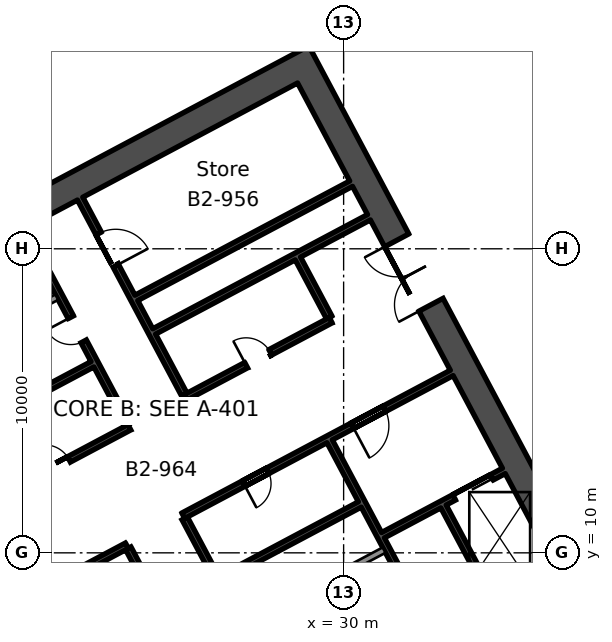
"""IFC4 building model, lengths in metres.
Left out: names, types, materials, properties, quantities, classifications, styles, units other than length and angle.
Written with IfcOpenShell. Run it as: python <this file> out.ifc"""

import sys

from ifc_helpers import new_model, si_unit, direction, frame, frame_2d, origin, place, context, subcontext, project, spatial, rectangle, extrude, element, fill, save


model = new_model("IFC4")
c1 = context("Model", 3, precision=1e-05, world=origin(), true_north=direction((0.0, 1.0)))
c2 = subcontext(c1, "Body", "Model", "MODEL_VIEW")
j1 = project(units=[si_unit("LENGTHUNIT", "METRE"), si_unit("PLANEANGLEUNIT", "RADIAN")], contexts=[c1])
p1 = place(None, origin())
s1 = spatial("IfcSite", under=j1, at=p1, CompositionType="ELEMENT")
p2 = place(p1, origin())
s2 = spatial("IfcBuilding", under=s1, at=p2, CompositionType="ELEMENT")
p3 = place(p2, frame((0.0, 0.0, -9.0)))
s3 = spatial("IfcBuildingStorey", under=s2, at=p3, CompositionType="ELEMENT", Elevation=-9.0)
p4 = place(p3, frame((37.849, 8.799, 0.0), z_axis=(0.0, 0.0, 1.0), x_axis=(-0.469465789982, 0.882950662289, 0.0)))
e1 = element("IfcWall", 1, at=p4, inside=s3, PredefinedType="SHEAR", context=c2, shape_type="SweptSolid", body=[
    extrude(rectangle(XDim=20.0, YDim=0.9, at=frame_2d((10.0, 0.0))), origin(), (0.0, 0.0, 1.0), 4.5),
])
p5 = place(p4, frame((10.6, 0.0, 0.0)))
e2 = element("IfcOpeningElement", 2, at=p5, cuts=e1, PredefinedType="OPENING", context=c2, shape_type="SweptSolid", body=[
    extrude(rectangle(XDim=2.4, YDim=2.4, at=frame_2d((1.2, 1.2))), frame((0.0, 0.46, 0.0), z_axis=(0.0, -1.0, 0.0), x_axis=(1.0, 0.0, 0.0)), (0.0, 0.0, 1.0), 0.92),
])
p6 = place(p3, frame((10.438, 16.366, 0.0), z_axis=(0.0, 0.0, 1.0), x_axis=(0.88294509198, 0.469476266226, 0.0)))
e3 = element("IfcWall", 3, at=p6, inside=s3, PredefinedType="SHEAR", context=c2, shape_type="SweptSolid", body=[
    extrude(rectangle(XDim=20.2, YDim=0.9, at=frame_2d((10.1, 0.0))), origin(), (0.0, 0.0, 1.0), 4.5),
])
p7 = place(p3, frame((26.346, 3.702, 0.0), z_axis=(0.0, 0.0, 1.0), x_axis=(-0.469480409012, 0.88294288918, 0.0)))
e4 = element("IfcWall", 4, at=p7, inside=s3, PredefinedType="SHEAR", context=c2, shape_type="SweptSolid", body=[
    extrude(rectangle(XDim=7.3, YDim=0.2, at=frame_2d((3.65, 0.0))), origin(), (0.0, 0.0, 1.0), 4.5),
])
p8 = place(p7, frame((1.3, 0.0, 0.0)))
e5 = element("IfcOpeningElement", 5, at=p8, cuts=e4, PredefinedType="OPENING", context=c2, shape_type="SweptSolid", body=[
    extrude(rectangle(XDim=1.2, YDim=2.1, at=frame_2d((0.6, 1.05))), frame((0.0, 0.11, 0.0), z_axis=(0.0, -1.0, 0.0), x_axis=(1.0, 0.0, 0.0)), (0.0, 0.0, 1.0), 0.22),
])
p9 = place(p3, frame((22.906, 14.218, 0.0), z_axis=(0.0, 0.0, 1.0), x_axis=(-0.469480409012, 0.88294288918, 0.0)))
e6 = element("IfcWall", 6, at=p9, inside=s3, PredefinedType="SHEAR", context=c2, shape_type="SweptSolid", body=[
    extrude(rectangle(XDim=7.3, YDim=0.2, at=frame_2d((3.65, 0.0))), origin(), (0.0, 0.0, 1.0), 4.5),
])
p10 = place(p9, frame((3.1, 0.0, 0.0)))
e7 = element("IfcOpeningElement", 7, at=p10, cuts=e6, PredefinedType="OPENING", context=c2, shape_type="SweptSolid", body=[
    extrude(rectangle(XDim=0.9, YDim=2.1, at=frame_2d((0.45, 1.05))), frame((0.0, 0.11, 0.0), z_axis=(0.0, -1.0, 0.0), x_axis=(1.0, 0.0, 0.0)), (0.0, 0.0, 1.0), 0.22),
])
p11 = place(p9, frame((5.6, 0.0, 0.0)))
e8 = element("IfcOpeningElement", 8, at=p11, cuts=e6, PredefinedType="OPENING", context=c2, shape_type="SweptSolid", body=[
    extrude(rectangle(XDim=0.9, YDim=2.1, at=frame_2d((0.45, 1.05))), frame((0.0, 0.11, 0.0), z_axis=(0.0, -1.0, 0.0), x_axis=(1.0, 0.0, 0.0)), (0.0, 0.0, 1.0), 0.22),
])
p12 = place(p3, frame((28.2, 4.688, 0.0), z_axis=(0.0, 0.0, 1.0), x_axis=(-0.469454336211, 0.882956752176, 0.0)))
e9 = element("IfcWall", 9, at=p12, inside=s3, PredefinedType="SHEAR", context=c2, shape_type="SweptSolid", body=[
    extrude(rectangle(XDim=7.3, YDim=0.2, at=frame_2d((3.65, 0.0))), origin(), (0.0, 0.0, 1.0), 4.5),
])
p13 = place(p12, frame((0.4, 0.0, 0.0)))
e10 = element("IfcOpeningElement", 10, at=p13, cuts=e9, PredefinedType="OPENING", context=c2, shape_type="SweptSolid", body=[
    extrude(rectangle(XDim=0.9, YDim=2.1, at=frame_2d((0.45, 1.05))), frame((0.0, 0.11, 0.0), z_axis=(0.0, -1.0, 0.0), x_axis=(1.0, 0.0, 0.0)), (0.0, 0.0, 1.0), 0.22),
])
p14 = place(p12, frame((2.05, 0.0, 0.0)))
e11 = element("IfcOpeningElement", 11, at=p14, cuts=e9, PredefinedType="OPENING", context=c2, shape_type="SweptSolid", body=[
    extrude(rectangle(XDim=0.9, YDim=2.1, at=frame_2d((0.45, 1.05))), frame((0.0, 0.11, 0.0), z_axis=(0.0, -1.0, 0.0), x_axis=(1.0, 0.0, 0.0)), (0.0, 0.0, 1.0), 0.22),
])
p15 = place(p12, frame((3.7, 0.0, 0.0)))
e12 = element("IfcOpeningElement", 12, at=p15, cuts=e9, PredefinedType="OPENING", context=c2, shape_type="SweptSolid", body=[
    extrude(rectangle(XDim=0.9, YDim=2.1, at=frame_2d((0.45, 1.05))), frame((0.0, 0.11, 0.0), z_axis=(0.0, -1.0, 0.0), x_axis=(1.0, 0.0, 0.0)), (0.0, 0.0, 1.0), 0.22),
])
p16 = place(p3, frame((24.76, 15.204, 0.0), z_axis=(0.0, 0.0, 1.0), x_axis=(-0.469494272526, 0.882935517501, 0.0)))
e13 = element("IfcWall", 13, at=p16, inside=s3, PredefinedType="SHEAR", context=c2, shape_type="SweptSolid", body=[
    extrude(rectangle(XDim=7.3, YDim=0.2, at=frame_2d((3.65, 0.0))), origin(), (0.0, 0.0, 1.0), 4.5),
])
p17 = place(p16, frame((4.8, 0.0, 0.0)))
e14 = element("IfcOpeningElement", 14, at=p17, cuts=e13, PredefinedType="OPENING", context=c2, shape_type="SweptSolid", body=[
    extrude(rectangle(XDim=1.2, YDim=2.1, at=frame_2d((0.6, 1.05))), frame((0.0, 0.11, 0.0), z_axis=(0.0, -1.0, 0.0), x_axis=(1.0, 0.0, 0.0)), (0.0, 0.0, 1.0), 0.22),
])
p18 = place(p3, frame((32.968, 7.223, 0.0), z_axis=(0.0, 0.0, 1.0), x_axis=(-0.469480409012, 0.88294288918, 0.0)))
e15 = element("IfcWall", 15, at=p18, inside=s3, PredefinedType="SHEAR", context=c2, shape_type="SweptSolid", body=[
    extrude(rectangle(XDim=7.3, YDim=0.2, at=frame_2d((3.65, 0.0))), origin(), (0.0, 0.0, 1.0), 4.5),
])
p19 = place(p3, frame((29.528, 17.739, 0.0), z_axis=(0.0, 0.0, 1.0), x_axis=(-0.469401318492, 0.882984938828, 0.0)))
e16 = element("IfcWall", 16, at=p19, inside=s3, PredefinedType="SHEAR", context=c2, shape_type="SweptSolid", body=[
    extrude(rectangle(XDim=2.2, YDim=0.2, at=frame_2d((1.1, 0.0))), origin(), (0.0, 0.0, 1.0), 4.5),
])
p20 = place(p3, frame((34.999, 8.303, 0.0), z_axis=(0.0, 0.0, 1.0), x_axis=(-0.4694665462, 0.882950260207, 0.0)))
e17 = element("IfcWall", 17, at=p20, inside=s3, PredefinedType="SHEAR", context=c2, shape_type="SweptSolid", body=[
    extrude(rectangle(XDim=3.65, YDim=0.2, at=frame_2d((1.825, 0.0))), origin(), (0.0, 0.0, 1.0), 4.5),
])
p21 = place(p3, frame((26.739, 7.648, 0.0), z_axis=(0.0, 0.0, 1.0), x_axis=(0.882934506056, 0.469496174655, 0.0)))
e18 = element("IfcWall", 18, at=p21, inside=s3, PredefinedType="SOLIDWALL", context=c2, shape_type="SweptSolid", body=[
    extrude(rectangle(XDim=5.2, YDim=0.2, at=frame_2d((2.6, 0.0))), origin(), (0.0, 0.0, 1.0), 4.5),
])
p22 = place(p3, frame((31.296, 10.581, 0.0), z_axis=(0.0, 0.0, 1.0), x_axis=(0.882960433586, 0.469447412093, 0.0)))
e19 = element("IfcWall", 19, at=p22, inside=s3, PredefinedType="SHEAR", context=c2, shape_type="SweptSolid", body=[
    extrude(rectangle(XDim=4.5, YDim=0.2, at=frame_2d((2.25, 0.0))), origin(), (0.0, 0.0, 1.0), 4.5),
])
p23 = place(p22, frame((2.65, 0.0, 0.0)))
e20 = element("IfcOpeningElement", 20, at=p23, cuts=e19, PredefinedType="OPENING", context=c2, shape_type="SweptSolid", body=[
    extrude(rectangle(XDim=1.4, YDim=2.4, at=frame_2d((0.7, 1.2))), frame((0.0, 0.11, 0.0), z_axis=(0.0, -1.0, 0.0), x_axis=(1.0, 0.0, 0.0)), (0.0, 0.0, 1.0), 0.22),
])
p24 = place(p3, frame((25.941, 9.15, 0.0), z_axis=(0.0, 0.0, 1.0), x_axis=(0.882953967957, 0.469459572775, 0.0)))
e21 = element("IfcWall", 21, at=p24, inside=s3, PredefinedType="SHEAR", context=c2, shape_type="SweptSolid", body=[
    extrude(rectangle(XDim=5.2, YDim=0.2, at=frame_2d((2.6, 0.0))), origin(), (0.0, 0.0, 1.0), 4.5),
])
p25 = place(p3, frame((18.104, 7.701, 0.0), z_axis=(0.0, 0.0, 1.0), x_axis=(0.882952937579, 0.469461510692, 0.0)))
e22 = element("IfcWall", 22, at=p25, inside=s3, PredefinedType="SHEAR", context=c2, shape_type="SweptSolid", body=[
    extrude(rectangle(XDim=5.4, YDim=0.2, at=frame_2d((2.7, 0.0))), origin(), (0.0, 0.0, 1.0), 4.5),
])
p26 = place(p25, frame((2.25, 0.0, 0.0)))
e23 = element("IfcOpeningElement", 23, at=p26, cuts=e22, PredefinedType="OPENING", context=c2, shape_type="SweptSolid", body=[
    extrude(rectangle(XDim=0.9, YDim=2.1, at=frame_2d((0.45, 1.05))), frame((0.0, 0.11, 0.0), z_axis=(0.0, -1.0, 0.0), x_axis=(1.0, 0.0, 0.0)), (0.0, 0.0, 1.0), 0.22),
])
p27 = place(p3, frame((24.726, 11.222, 0.0), z_axis=(0.0, 0.0, 1.0), x_axis=(0.882940221191, 0.469485426614, 0.0)))
e24 = element("IfcWall", 24, at=p27, inside=s3, PredefinedType="SHEAR", context=c2, shape_type="SweptSolid", body=[
    extrude(rectangle(XDim=10.0, YDim=0.2, at=frame_2d((5.0, 0.0))), origin(), (0.0, 0.0, 1.0), 4.5),
])
p28 = place(p27, frame((6.3, 0.0, 0.0)))
e25 = element("IfcOpeningElement", 25, at=p28, cuts=e24, PredefinedType="OPENING", context=c2, shape_type="SweptSolid", body=[
    extrude(rectangle(XDim=1.2, YDim=2.1, at=frame_2d((0.6, 1.05))), frame((0.0, 0.11, 0.0), z_axis=(0.0, -1.0, 0.0), x_axis=(1.0, 0.0, 0.0)), (0.0, 0.0, 1.0), 0.22),
])
p29 = place(p27, frame((2.25, 0.0, 0.0)))
e26 = element("IfcOpeningElement", 26, at=p29, cuts=e24, PredefinedType="OPENING", context=c2, shape_type="SweptSolid", body=[
    extrude(rectangle(XDim=0.9, YDim=2.1, at=frame_2d((0.45, 1.05))), frame((0.0, 0.11, 0.0), z_axis=(0.0, -1.0, 0.0), x_axis=(1.0, 0.0, 0.0)), (0.0, 0.0, 1.0), 0.22),
])
p30 = place(p3, frame((14.124, 9.435, 0.0), z_axis=(0.0, 0.0, 1.0), x_axis=(0.882940221191, 0.469485426614, 0.0)))
e27 = element("IfcWall", 27, at=p30, inside=s3, PredefinedType="SHEAR", context=c2, shape_type="SweptSolid", body=[
    extrude(rectangle(XDim=10.0, YDim=0.2, at=frame_2d((5.0, 0.0))), origin(), (0.0, 0.0, 1.0), 4.5),
])
p31 = place(p30, frame((2.1, 0.0, 0.0)))
e28 = element("IfcOpeningElement", 28, at=p31, cuts=e27, PredefinedType="OPENING", context=c2, shape_type="SweptSolid", body=[
    extrude(rectangle(XDim=1.2, YDim=2.1, at=frame_2d((0.6, 1.05))), frame((0.0, 0.11, 0.0), z_axis=(0.0, -1.0, 0.0), x_axis=(1.0, 0.0, 0.0)), (0.0, 0.0, 1.0), 0.22),
])
p32 = place(p30, frame((6.85, 0.0, 0.0)))
e29 = element("IfcOpeningElement", 29, at=p32, cuts=e27, PredefinedType="OPENING", context=c2, shape_type="SweptSolid", body=[
    extrude(rectangle(XDim=0.9, YDim=2.1, at=frame_2d((0.45, 1.05))), frame((0.0, 0.11, 0.0), z_axis=(0.0, -1.0, 0.0), x_axis=(1.0, 0.0, 0.0)), (0.0, 0.0, 1.0), 0.22),
])
p33 = place(p3, frame((24.807, 15.116, 0.0), z_axis=(0.0, 0.0, 1.0), x_axis=(0.882942972946, 0.469480251476, 0.0)))
e30 = element("IfcWall", 30, at=p33, inside=s3, PredefinedType="SHEAR", context=c2, shape_type="SweptSolid", body=[
    extrude(rectangle(XDim=5.4, YDim=0.2, at=frame_2d((2.7, 0.0))), origin(), (0.0, 0.0, 1.0), 4.5),
])
p34 = place(p33, frame((2.25, 0.0, 0.0)))
e31 = element("IfcOpeningElement", 31, at=p34, cuts=e30, PredefinedType="OPENING", context=c2, shape_type="SweptSolid", body=[
    extrude(rectangle(XDim=0.9, YDim=2.1, at=frame_2d((0.45, 1.05))), frame((0.0, 0.11, 0.0), z_axis=(0.0, -1.0, 0.0), x_axis=(1.0, 0.0, 0.0)), (0.0, 0.0, 1.0), 0.22),
])
p35 = place(p3, frame((17.147, 13.761, 0.0), z_axis=(0.0, 0.0, 1.0), x_axis=(0.882964314875, 0.469440111896, 0.0)))
e32 = element("IfcWall", 32, at=p35, inside=s3, PredefinedType="SHEAR", context=c2, shape_type="SweptSolid", body=[
    extrude(rectangle(XDim=5.2, YDim=0.2, at=frame_2d((2.6, 0.0))), origin(), (0.0, 0.0, 1.0), 4.5),
])
p36 = place(p3, frame((23.769, 17.282, 0.0), z_axis=(0.0, 0.0, 1.0), x_axis=(0.882940221191, 0.469485426614, 0.0)))
e33 = element("IfcWall", 33, at=p36, inside=s3, PredefinedType="SHEAR", context=c2, shape_type="SweptSolid", body=[
    extrude(rectangle(XDim=8.0, YDim=0.2, at=frame_2d((4.0, 0.0))), origin(), (0.0, 0.0, 1.0), 4.5),
])
p37 = place(p3, frame((23.182, 18.385, 0.0), z_axis=(0.0, 0.0, 1.0), x_axis=(0.88295287151, 0.469461634952, 0.0)))
e34 = element("IfcWall", 34, at=p37, inside=s3, PredefinedType="SHEAR", context=c2, shape_type="SweptSolid", body=[
    extrude(rectangle(XDim=8.0, YDim=0.2, at=frame_2d((4.0, 0.0))), origin(), (0.0, 0.0, 1.0), 4.5),
])
p38 = place(p3, frame((15.973, 15.968, 0.0), z_axis=(0.0, 0.0, 1.0), x_axis=(0.882953967957, 0.469459572775, 0.0)))
e35 = element("IfcWall", 35, at=p38, inside=s3, PredefinedType="SOLIDWALL", context=c2, shape_type="SweptSolid", body=[
    extrude(rectangle(XDim=5.2, YDim=0.2, at=frame_2d((2.6, 0.0))), origin(), (0.0, 0.0, 1.0), 4.5),
])
p39 = place(p5, origin())
e36 = element("IfcDoor", 36, at=p39, inside=s3, OperationType="DOUBLE_DOOR_SINGLE_SWING", PredefinedType="DOOR", context=c2, shape_type="SweptSolid", body=[
    extrude(rectangle(XDim=2.4, YDim=2.4, at=frame_2d((1.2, 1.2))), frame((0.0, 0.025, 0.0), z_axis=(0.0, -1.0, 0.0), x_axis=(1.0, 0.0, 0.0)), (0.0, 0.0, 1.0), 0.05),
])
fill(e2, e36)
p40 = place(p28, frame((1.2, 0.0, 0.0), z_axis=(0.0, 0.0, 1.0), x_axis=(-1.0, 0.0, 0.0)))
e37 = element("IfcDoor", 37, at=p40, inside=s3, OperationType="SINGLE_SWING_RIGHT", PredefinedType="DOOR", context=c2, shape_type="SweptSolid", body=[
    extrude(rectangle(XDim=1.2, YDim=2.1, at=frame_2d((0.6, 1.05))), frame((0.0, 0.025, 0.0), z_axis=(0.0, -1.0, 0.0), x_axis=(1.0, 0.0, 0.0)), (0.0, 0.0, 1.0), 0.05),
])
fill(e25, e37)
p41 = place(p17, frame((1.2, 0.0, 0.0), z_axis=(0.0, 0.0, 1.0), x_axis=(-1.0, 0.0, 0.0)))
e38 = element("IfcDoor", 38, at=p41, inside=s3, OperationType="SINGLE_SWING_RIGHT", PredefinedType="DOOR", context=c2, shape_type="SweptSolid", body=[
    extrude(rectangle(XDim=1.2, YDim=2.1, at=frame_2d((0.6, 1.05))), frame((0.0, 0.025, 0.0), z_axis=(0.0, -1.0, 0.0), x_axis=(1.0, 0.0, 0.0)), (0.0, 0.0, 1.0), 0.05),
])
fill(e14, e38)
p42 = place(p32, origin())
e39 = element("IfcDoor", 39, at=p42, inside=s3, OperationType="SINGLE_SWING_LEFT", PredefinedType="DOOR", context=c2, shape_type="SweptSolid", body=[
    extrude(rectangle(XDim=0.9, YDim=2.1, at=frame_2d((0.45, 1.05))), frame((0.0, 0.025, 0.0), z_axis=(0.0, -1.0, 0.0), x_axis=(1.0, 0.0, 0.0)), (0.0, 0.0, 1.0), 0.05),
])
fill(e29, e39)
p43 = place(p34, origin())
e40 = element("IfcDoor", 40, at=p43, inside=s3, OperationType="SINGLE_SWING_LEFT", PredefinedType="DOOR", context=c2, shape_type="SweptSolid", body=[
    extrude(rectangle(XDim=0.9, YDim=2.1, at=frame_2d((0.45, 1.05))), frame((0.0, 0.025, 0.0), z_axis=(0.0, -1.0, 0.0), x_axis=(1.0, 0.0, 0.0)), (0.0, 0.0, 1.0), 0.05),
])
fill(e31, e40)
p44 = place(p29, frame((0.9, 0.0, 0.0), z_axis=(0.0, 0.0, 1.0), x_axis=(-1.0, 0.0, 0.0)))
e41 = element("IfcDoor", 41, at=p44, inside=s3, OperationType="SINGLE_SWING_RIGHT", PredefinedType="DOOR", context=c2, shape_type="SweptSolid", body=[
    extrude(rectangle(XDim=0.9, YDim=2.1, at=frame_2d((0.45, 1.05))), frame((0.0, 0.025, 0.0), z_axis=(0.0, -1.0, 0.0), x_axis=(1.0, 0.0, 0.0)), (0.0, 0.0, 1.0), 0.05),
])
fill(e26, e41)
p45 = place(p23, origin())
e42 = element("IfcDoor", 42, at=p45, inside=s3, OperationType="DOUBLE_DOOR_SLIDING", PredefinedType="DOOR", context=c2, shape_type="SweptSolid", body=[
    extrude(rectangle(XDim=1.4, YDim=2.4, at=frame_2d((0.7, 1.2))), frame((0.0, 0.025, 0.0), z_axis=(0.0, -1.0, 0.0), x_axis=(1.0, 0.0, 0.0)), (0.0, 0.0, 1.0), 0.05),
])
fill(e20, e42)
p46 = place(p10, origin())
e43 = element("IfcDoor", 43, at=p46, inside=s3, OperationType="SINGLE_SWING_RIGHT", PredefinedType="DOOR", context=c2, shape_type="SweptSolid", body=[
    extrude(rectangle(XDim=0.9, YDim=2.1, at=frame_2d((0.45, 1.05))), frame((0.0, 0.025, 0.0), z_axis=(0.0, -1.0, 0.0), x_axis=(1.0, 0.0, 0.0)), (0.0, 0.0, 1.0), 0.05),
])
fill(e7, e43)
save(model, sys.argv[1])
